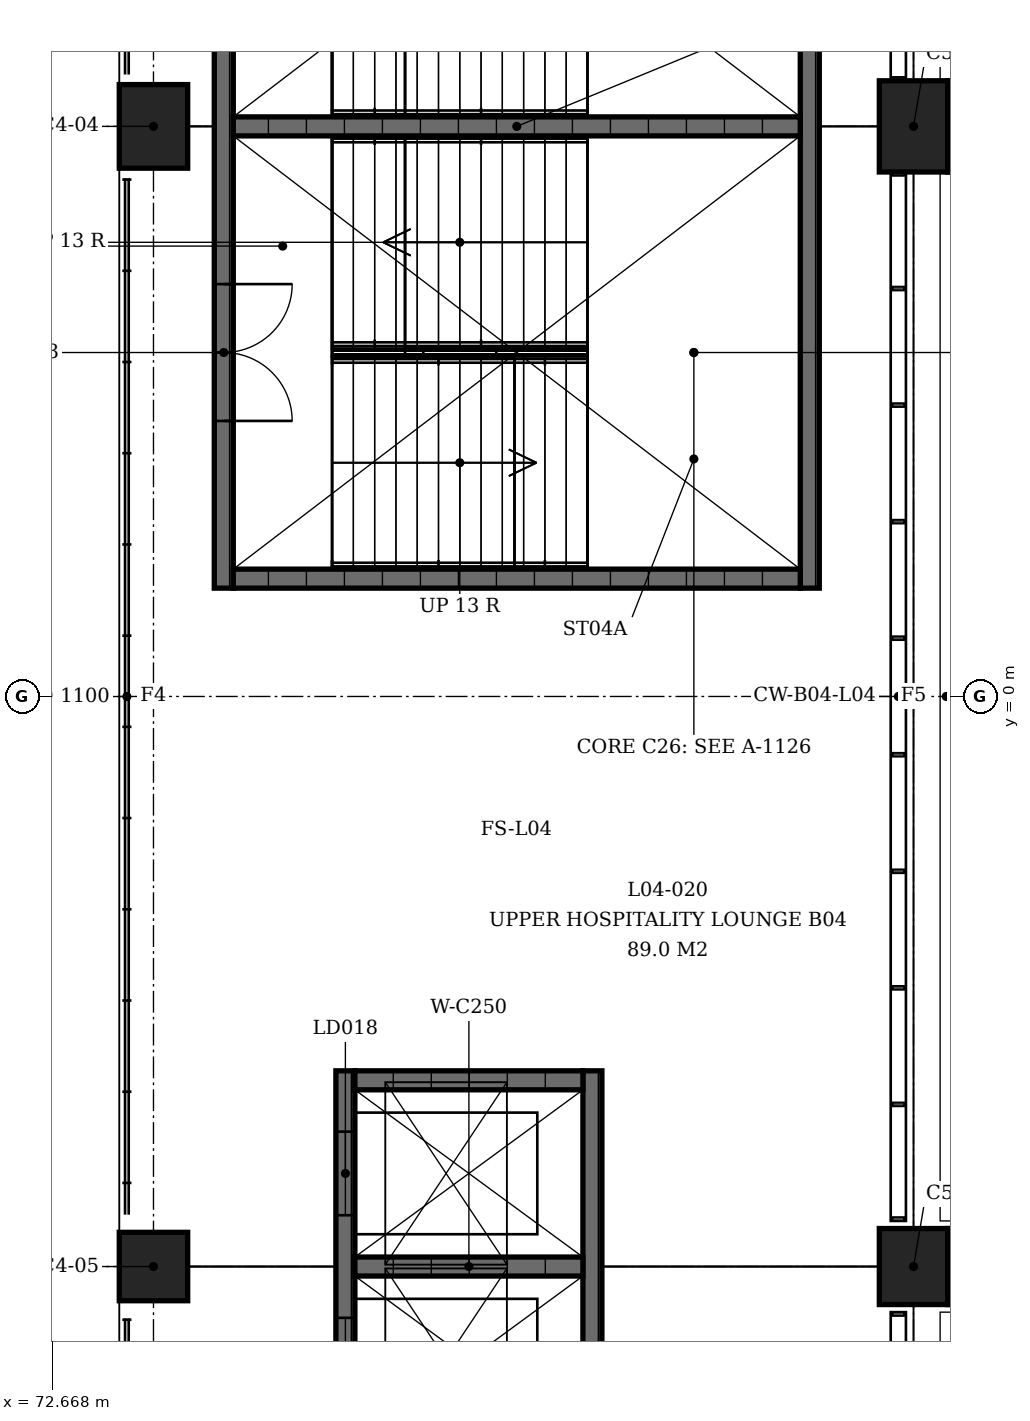
"""IFC4 building model, lengths in metres.
Left out: names, types, materials, properties, quantities, classifications, styles, units other than length and angle.
Written with IfcOpenShell. Run it as: python <this file> out.ifc"""

import sys

from ifc_helpers import new_model, si_unit, direction, frame, frame_2d, origin, origin_2d, place, context, subcontext, project, spatial, rectangle, extrude, element, fill, save


model = new_model("IFC4")
c1 = context("Model", 3, precision=1e-05, world=origin(), true_north=direction((0.0, 1.0)))
c2 = subcontext(c1, "Body", "Model", "MODEL_VIEW")
j1 = project(units=[si_unit("LENGTHUNIT", "METRE"), si_unit("PLANEANGLEUNIT", "RADIAN")], contexts=[c1])
p1 = place(None, origin())
s1 = spatial("IfcSite", under=j1, at=p1, CompositionType="ELEMENT")
p2 = place(p1, origin())
s2 = spatial("IfcBuilding", under=s1, at=p2, CompositionType="ELEMENT")
p3 = place(p2, frame((0.0, 0.0, 18.0)))
s3 = spatial("IfcBuildingStorey", under=s2, at=p3, CompositionType="ELEMENT", Elevation=18.0)
p4 = place(p3, frame((74.0, 7.5, 0.0), z_axis=(0.0, 0.0, 1.0), x_axis=(0.0, 1.0, 0.0)))
e1 = element("IfcColumn", 1, at=p4, inside=s3, PredefinedType="COLUMN", context=c2, shape_type="SweptSolid", body=[
    extrude(rectangle(XDim=1.1, YDim=0.9, at=origin_2d()), origin(), (0.0, 0.0, 1.0), 4.5),
])
p5 = place(p3, frame((84.0, 7.5, 0.0), z_axis=(0.0, 0.0, 1.0), x_axis=(0.0, 1.0, 0.0)))
e2 = element("IfcColumn", 2, at=p5, inside=s3, PredefinedType="COLUMN", context=c2, shape_type="SweptSolid", body=[
    extrude(rectangle(XDim=1.2, YDim=0.9, at=origin_2d()), origin(), (0.0, 0.0, 1.0), 4.5),
])
p6 = place(p3, frame((74.0, -7.5, 0.0), z_axis=(0.0, 0.0, 1.0), x_axis=(0.0, 1.0, 0.0)))
e3 = element("IfcColumn", 3, at=p6, inside=s3, PredefinedType="COLUMN", context=c2, shape_type="SweptSolid", body=[
    extrude(rectangle(XDim=0.9, YDim=0.9, at=origin_2d()), origin(), (0.0, 0.0, 1.0), 4.5),
])
p7 = place(p3, frame((84.0, -7.5, 0.0), z_axis=(0.0, 0.0, 1.0), x_axis=(0.0, 1.0, 0.0)))
e4 = element("IfcColumn", 4, at=p7, inside=s3, PredefinedType="COLUMN", context=c2, shape_type="SweptSolid", body=[
    extrude(rectangle(XDim=1.0, YDim=0.9, at=origin_2d()), origin(), (0.0, 0.0, 1.0), 4.5),
])
p8 = place(p3, frame((74.925, 1.425, 0.0), z_axis=(0.0, 0.0, 1.0), x_axis=(0.0, 1.0, 0.0)))
e5 = element("IfcWall", 5, at=p8, inside=s3, PredefinedType="SHEAR", context=c2, shape_type="SweptSolid", body=[
    extrude(rectangle(XDim=12.15, YDim=0.25, at=frame_2d((6.075, 0.0))), origin(), (0.0, 0.0, 1.0), 4.09),
])
p9 = place(p8, frame((2.2, 0.0, 0.0)))
e6 = element("IfcOpeningElement", 6, at=p9, cuts=e5, PredefinedType="OPENING", context=c2, shape_type="SweptSolid", body=[
    extrude(rectangle(XDim=1.8, YDim=2.1, at=frame_2d((0.9, 1.05))), frame((0.0, 0.125, 0.0), z_axis=(0.0, -1.0, 0.0), x_axis=(1.0, 0.0, 0.0)), (0.0, 0.0, 1.0), 0.25),
])
p10 = place(p8, frame((8.15, 0.0, 0.0)))
e7 = element("IfcOpeningElement", 7, at=p10, cuts=e5, PredefinedType="OPENING", context=c2, shape_type="SweptSolid", body=[
    extrude(rectangle(XDim=1.8, YDim=2.1, at=frame_2d((0.9, 1.05))), frame((0.0, 0.125, 0.0), z_axis=(0.0, -1.0, 0.0), x_axis=(1.0, 0.0, 0.0)), (0.0, 0.0, 1.0), 0.25),
])
p11 = place(p3, frame((82.635, 1.425, 0.0), z_axis=(0.0, 0.0, 1.0), x_axis=(0.0, 1.0, 0.0)))
e8 = element("IfcWall", 8, at=p11, inside=s3, PredefinedType="SHEAR", context=c2, shape_type="SweptSolid", body=[
    extrude(rectangle(XDim=12.15, YDim=0.25, at=frame_2d((6.075, 0.0))), origin(), (0.0, 0.0, 1.0), 4.09),
])
for number, where, z_axis, x_axis in (
    (9, (75.05, 1.55, 0.0), (0.0, 0.0, 1.0), (1.0, 0.0, 0.0)),
    (10, (75.05, 7.5, 0.0), (0.0, 0.0, 1.0), (1.0, 0.0, 0.0)),
):
    element("IfcWall", number, at=place(p3, frame(where, z_axis=z_axis, x_axis=x_axis)), inside=s3, PredefinedType="SHEAR", context=c2, shape_type="SweptSolid", body=[
        extrude(rectangle(XDim=7.46, YDim=0.25, at=frame_2d((3.73, 0.0))), origin(), (0.0, 0.0, 1.0), 4.09),
    ])
p12 = place(p3, frame((76.525, -10.075, 0.0), z_axis=(0.0, 0.0, 1.0), x_axis=(0.0, 1.0, 0.0)))
e11 = element("IfcWall", 11, at=p12, inside=s3, PredefinedType="SHEAR", context=c2, shape_type="SweptSolid", body=[
    extrude(rectangle(XDim=5.15, YDim=0.25, at=frame_2d((2.575, 0.0))), origin(), (0.0, 0.0, 1.0), 4.09),
])
p13 = place(p12, frame((0.8, 0.0, 0.0)))
e12 = element("IfcOpeningElement", 12, at=p13, cuts=e11, PredefinedType="OPENING", context=c2, shape_type="SweptSolid", body=[
    extrude(rectangle(XDim=1.1, YDim=2.1, at=frame_2d((0.55, 1.05))), frame((0.0, 0.125, 0.0), z_axis=(0.0, -1.0, 0.0), x_axis=(1.0, 0.0, 0.0)), (0.0, 0.0, 1.0), 0.25),
])
p14 = place(p12, frame((3.25, 0.0, 0.0)))
e13 = element("IfcOpeningElement", 13, at=p14, cuts=e11, PredefinedType="OPENING", context=c2, shape_type="SweptSolid", body=[
    extrude(rectangle(XDim=1.1, YDim=2.1, at=frame_2d((0.55, 1.05))), frame((0.0, 0.125, 0.0), z_axis=(0.0, -1.0, 0.0), x_axis=(1.0, 0.0, 0.0)), (0.0, 0.0, 1.0), 0.25),
])
p15 = place(p3, frame((79.775, -10.075, 0.0), z_axis=(0.0, 0.0, 1.0), x_axis=(0.0, 1.0, 0.0)))
e14 = element("IfcWall", 14, at=p15, inside=s3, PredefinedType="SHEAR", context=c2, shape_type="SweptSolid", body=[
    extrude(rectangle(XDim=5.15, YDim=0.25, at=frame_2d((2.575, 0.0))), origin(), (0.0, 0.0, 1.0), 4.09),
])
for number, where, z_axis, x_axis in (
    (15, (76.65, -5.05, 0.0), (0.0, 0.0, 1.0), (1.0, 0.0, 0.0)),
    (16, (76.65, -7.5, 0.0), (0.0, 0.0, 1.0), (1.0, 0.0, 0.0)),
):
    element("IfcWall", number, at=place(p3, frame(where, z_axis=z_axis, x_axis=x_axis)), inside=s3, PredefinedType="SHEAR", context=c2, shape_type="SweptSolid", body=[
        extrude(rectangle(XDim=3.0, YDim=0.25, at=frame_2d((1.5, 0.0))), origin(), (0.0, 0.0, 1.0), 4.09),
    ])
p16 = place(p9, origin())
e17 = element("IfcDoor", 17, at=p16, inside=s3, OperationType="DOUBLE_DOOR_SINGLE_SWING", PredefinedType="DOOR", context=c2, shape_type="SweptSolid", body=[
    extrude(rectangle(XDim=1.8, YDim=2.1, at=frame_2d((0.9, 1.05))), frame((0.0, 0.025, 0.0), z_axis=(0.0, -1.0, 0.0), x_axis=(1.0, 0.0, 0.0)), (0.0, 0.0, 1.0), 0.05),
])
fill(e6, e17)
p17 = place(p13, origin())
e18 = element("IfcDoor", 18, at=p17, inside=s3, OperationType="SLIDING_TO_LEFT", PredefinedType="DOOR", context=c2, shape_type="SweptSolid", body=[
    extrude(rectangle(XDim=1.1, YDim=2.1, at=frame_2d((0.55, 1.05))), frame((0.0, 0.025, 0.0), z_axis=(0.0, -1.0, 0.0), x_axis=(1.0, 0.0, 0.0)), (0.0, 0.0, 1.0), 0.05),
])
fill(e12, e18)
p18 = place(p14, origin())
e19 = element("IfcDoor", 19, at=p18, inside=s3, OperationType="SLIDING_TO_LEFT", PredefinedType="DOOR", context=c2, shape_type="SweptSolid", body=[
    extrude(rectangle(XDim=1.1, YDim=2.1, at=frame_2d((0.55, 1.05))), frame((0.0, 0.025, 0.0), z_axis=(0.0, -1.0, 0.0), x_axis=(1.0, 0.0, 0.0)), (0.0, 0.0, 1.0), 0.05),
])
fill(e13, e19)
save(model, sys.argv[1])
